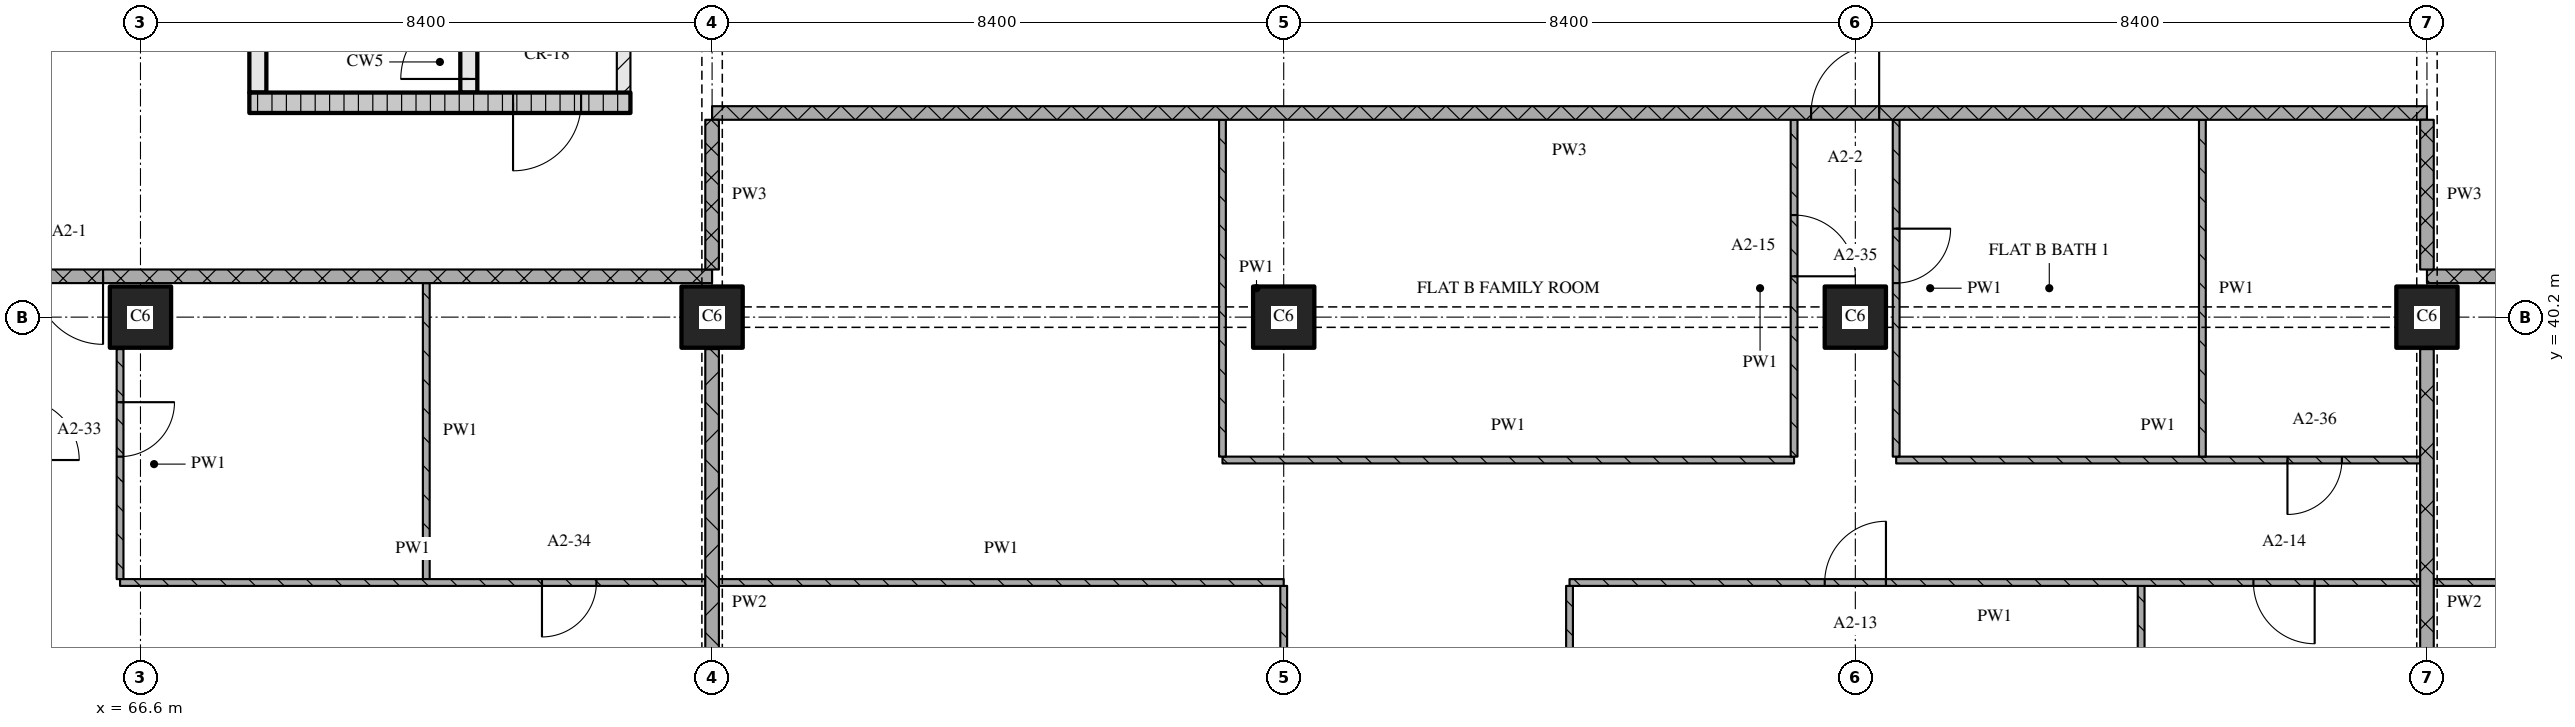
"""IFC4 building model, lengths in metres.
Left out: names, types, materials, properties, quantities, classifications, styles, units other than length and angle.
Written with IfcOpenShell. Run it as: python <this file> out.ifc"""

import sys

from ifc_helpers import new_model, si_unit, direction, frame, frame_2d, origin, origin_2d, place, context, subcontext, project, spatial, rectangle, extrude, element, fill, save


model = new_model("IFC4")
c1 = context("Model", 3, precision=1e-05, world=origin(), true_north=direction((0.0, 1.0)))
c2 = subcontext(c1, "Body", "Model", "MODEL_VIEW")
j1 = project(units=[si_unit("LENGTHUNIT", "METRE"), si_unit("PLANEANGLEUNIT", "RADIAN")], contexts=[c1])
p1 = place(None, origin())
s1 = spatial("IfcSite", under=j1, at=p1, CompositionType="ELEMENT")
p2 = place(p1, origin())
s2 = spatial("IfcBuilding", under=s1, at=p2, CompositionType="ELEMENT")
p3 = place(p2, frame((0.0, 0.0, 48.0)))
s3 = spatial("IfcBuildingStorey", under=s2, at=p3, CompositionType="ELEMENT", Elevation=48.0)
for number, where, z_axis, x_axis in (
    (1, (66.6, 40.2, 0.0), (0.0, 0.0, 1.0), (1.0, 0.0, 0.0)),
    (2, (75.0, 40.2, 0.0), (0.0, 0.0, 1.0), (1.0, 0.0, 0.0)),
    (3, (83.4, 40.2, 0.0), (0.0, 0.0, 1.0), (1.0, 0.0, 0.0)),
    (4, (91.8, 40.2, 0.0), (0.0, 0.0, 1.0), (1.0, 0.0, 0.0)),
    (5, (100.2, 40.2, 0.0), (0.0, 0.0, 1.0), (1.0, 0.0, 0.0)),
):
    element("IfcColumn", number, at=place(p3, frame(where, z_axis=z_axis, x_axis=x_axis)), inside=s3, PredefinedType="COLUMN", context=c2, shape_type="SweptSolid", body=[
        extrude(rectangle(XDim=0.9, YDim=0.9, at=origin_2d()), origin(), (0.0, 0.0, 1.0), 3.6),
    ])
p4 = place(p3, frame((68.2, 43.35, 0.0), z_axis=(0.0, 0.0, 1.0), x_axis=(1.0, 0.0, 0.0)))
e6 = element("IfcWall", 6, at=p4, inside=s3, PredefinedType="SOLIDWALL", context=c2, shape_type="SweptSolid", body=[
    extrude(rectangle(XDim=5.6, YDim=0.3, at=frame_2d((2.8, 0.0))), origin(), (0.0, 0.0, 1.0), 3.32),
])
p5 = place(p4, frame((3.875, 0.0, 0.0)))
e7 = element("IfcOpeningElement", 7, at=p5, cuts=e6, PredefinedType="OPENING", context=c2, shape_type="SweptSolid", body=[
    extrude(rectangle(XDim=1.0, YDim=2.1, at=frame_2d((0.5, 1.05))), frame((0.0, 0.16, 0.0), z_axis=(0.0, -1.0, 0.0), x_axis=(1.0, 0.0, 0.0)), (0.0, 0.0, 1.0), 0.32),
])
p6 = place(p3, frame((68.325, 43.5, 0.0), z_axis=(0.0, 0.0, 1.0), x_axis=(0.0, 1.0, 0.0)))
e8 = element("IfcWall", 8, at=p6, inside=s3, PredefinedType="SOLIDWALL", context=c2, shape_type="SweptSolid", body=[
    extrude(rectangle(XDim=6.9, YDim=0.25, at=frame_2d((3.45, 0.0))), origin(), (0.0, 0.0, 1.0), 3.32),
])
p7 = place(p3, frame((71.425, 43.5, 0.0), z_axis=(0.0, 0.0, 1.0), x_axis=(0.0, 1.0, 0.0)))
e9 = element("IfcWall", 9, at=p7, inside=s3, PredefinedType="SOLIDWALL", context=c2, shape_type="SweptSolid", body=[
    extrude(rectangle(XDim=6.9, YDim=0.25, at=frame_2d((3.45, 0.0))), origin(), (0.0, 0.0, 1.0), 3.32),
])
p8 = place(p7, frame((0.2, 0.0, 0.0)))
e10 = element("IfcOpeningElement", 10, at=p8, cuts=e9, PredefinedType="OPENING", context=c2, shape_type="SweptSolid", body=[
    extrude(rectangle(XDim=1.0, YDim=2.1, at=frame_2d((0.5, 1.05))), frame((0.0, 0.135, 0.0), z_axis=(0.0, -1.0, 0.0), x_axis=(1.0, 0.0, 0.0)), (0.0, 0.0, 1.0), 0.27),
])
p9 = place(p3, frame((73.7, 43.5, 0.0), z_axis=(0.0, 0.0, 1.0), x_axis=(0.0, 1.0, 0.0)))
e11 = element("IfcWall", 11, at=p9, inside=s3, PredefinedType="PARTITIONING", context=c2, shape_type="SweptSolid", body=[
    extrude(rectangle(XDim=6.9, YDim=0.2, at=frame_2d((3.45, 0.0))), origin(), (0.0, 0.0, 1.0), 3.32),
])
p10 = place(p9, frame((1.0, 0.0, 0.0)))
e12 = element("IfcOpeningElement", 12, at=p10, cuts=e11, PredefinedType="OPENING", context=c2, shape_type="SweptSolid", body=[
    extrude(rectangle(XDim=1.0, YDim=2.1, at=frame_2d((0.5, 1.05))), frame((0.0, 0.11, 0.0), z_axis=(0.0, -1.0, 0.0), x_axis=(1.0, 0.0, 0.0)), (0.0, 0.0, 1.0), 0.22),
])
p11 = place(p3, frame((82.5, 38.1, 0.0), z_axis=(0.0, 0.0, 1.0), x_axis=(1.0, 0.0, 0.0)))
e13 = element("IfcWall", 13, at=p11, inside=s3, PredefinedType="PARTITIONING", context=c2, shape_type="SweptSolid", body=[
    extrude(rectangle(XDim=8.4, YDim=0.1, at=frame_2d((4.2, 0.0))), origin(), (0.0, 0.0, 1.0), 3.32),
])
p12 = place(p3, frame((92.4, 38.1, 0.0), z_axis=(0.0, 0.0, 1.0), x_axis=(1.0, 0.0, 0.0)))
e14 = element("IfcWall", 14, at=p12, inside=s3, PredefinedType="PARTITIONING", context=c2, shape_type="SweptSolid", body=[
    extrude(rectangle(XDim=7.7, YDim=0.1, at=frame_2d((3.85, 0.0))), origin(), (0.0, 0.0, 1.0), 3.32),
])
p13 = place(p12, frame((5.75, 0.0, 0.0)))
e15 = element("IfcOpeningElement", 15, at=p13, cuts=e14, PredefinedType="OPENING", context=c2, shape_type="SweptSolid", body=[
    extrude(rectangle(XDim=0.8, YDim=2.1, at=frame_2d((0.4, 1.05))), frame((0.0, 0.06, 0.0), z_axis=(0.0, -1.0, 0.0), x_axis=(1.0, 0.0, 0.0)), (0.0, 0.0, 1.0), 0.12),
])
p14 = place(p3, frame((75.0, 40.8, 0.0), z_axis=(0.0, 0.0, 1.0), x_axis=(-1.0, 0.0, 0.0)))
e16 = element("IfcWall", 16, at=p14, inside=s3, PredefinedType="PARTITIONING", context=c2, shape_type="SweptSolid", body=[
    extrude(rectangle(XDim=24.08, YDim=0.2, at=frame_2d((12.04, 0.0))), origin(), (0.0, 0.0, 1.0), 3.32),
])
p15 = place(p14, frame((8.95, 0.0, 0.0)))
e17 = element("IfcOpeningElement", 17, at=p15, cuts=e16, PredefinedType="OPENING", context=c2, shape_type="SweptSolid", body=[
    extrude(rectangle(XDim=1.0, YDim=2.1, at=frame_2d((0.5, 1.05))), frame((0.0, 0.11, 0.0), z_axis=(0.0, -1.0, 0.0), x_axis=(1.0, 0.0, 0.0)), (0.0, 0.0, 1.0), 0.22),
])
p16 = place(p3, frame((124.28, 40.8, 0.0), z_axis=(0.0, 0.0, 1.0), x_axis=(-1.0, 0.0, 0.0)))
e18 = element("IfcWall", 18, at=p16, inside=s3, PredefinedType="PARTITIONING", context=c2, shape_type="SweptSolid", body=[
    extrude(rectangle(XDim=24.08, YDim=0.2, at=frame_2d((12.04, 0.0))), origin(), (0.0, 0.0, 1.0), 3.32),
])
p17 = place(p16, frame((12.93, 0.0, 0.0)))
e19 = element("IfcOpeningElement", 19, at=p17, cuts=e18, PredefinedType="OPENING", context=c2, shape_type="SweptSolid", body=[
    extrude(rectangle(XDim=1.0, YDim=2.1, at=frame_2d((0.5, 1.05))), frame((0.0, 0.11, 0.0), z_axis=(0.0, -1.0, 0.0), x_axis=(1.0, 0.0, 0.0)), (0.0, 0.0, 1.0), 0.22),
])
p18 = place(p3, frame((100.2, 43.2, 0.0), z_axis=(0.0, 0.0, 1.0), x_axis=(-1.0, 0.0, 0.0)))
e20 = element("IfcWall", 20, at=p18, inside=s3, PredefinedType="PARTITIONING", context=c2, shape_type="SweptSolid", body=[
    extrude(rectangle(XDim=25.2, YDim=0.2, at=frame_2d((12.6, 0.0))), origin(), (0.0, 0.0, 1.0), 3.32),
])
p19 = place(p18, frame((8.05, 0.0, 0.0)))
e21 = element("IfcOpeningElement", 21, at=p19, cuts=e20, PredefinedType="OPENING", context=c2, shape_type="SweptSolid", body=[
    extrude(rectangle(XDim=1.0, YDim=2.1, at=frame_2d((0.5, 1.05))), frame((0.0, 0.11, 0.0), z_axis=(0.0, -1.0, 0.0), x_axis=(1.0, 0.0, 0.0)), (0.0, 0.0, 1.0), 0.22),
])
p20 = place(p3, frame((66.3, 39.73, 0.0), z_axis=(0.0, 0.0, 1.0), x_axis=(0.0, -1.0, 0.0)))
e22 = element("IfcWall", 22, at=p20, inside=s3, PredefinedType="PARTITIONING", context=c2, shape_type="SweptSolid", body=[
    extrude(rectangle(XDim=3.38, YDim=0.1, at=frame_2d((1.69, 0.0))), origin(), (0.0, 0.0, 1.0), 3.32),
])
p21 = place(p20, frame((0.78, 0.0, 0.0)))
e23 = element("IfcOpeningElement", 23, at=p21, cuts=e22, PredefinedType="OPENING", context=c2, shape_type="SweptSolid", body=[
    extrude(rectangle(XDim=0.8, YDim=2.1, at=frame_2d((0.4, 1.05))), frame((0.0, 0.06, 0.0), z_axis=(0.0, -1.0, 0.0), x_axis=(1.0, 0.0, 0.0)), (0.0, 0.0, 1.0), 0.12),
])
p22 = place(p3, frame((70.8, 40.7, 0.0), z_axis=(0.0, 0.0, 1.0), x_axis=(0.0, -1.0, 0.0)))
e24 = element("IfcWall", 24, at=p22, inside=s3, PredefinedType="PARTITIONING", context=c2, shape_type="SweptSolid", body=[
    extrude(rectangle(XDim=4.35, YDim=0.1, at=frame_2d((2.175, 0.0))), origin(), (0.0, 0.0, 1.0), 3.32),
])
p23 = place(p3, frame((75.0, 43.1, 0.0), z_axis=(0.0, 0.0, 1.0), x_axis=(0.0, -1.0, 0.0)))
e25 = element("IfcWall", 25, at=p23, inside=s3, PredefinedType="PARTITIONING", context=c2, shape_type="SweptSolid", body=[
    extrude(rectangle(XDim=2.2, YDim=0.2, at=frame_2d((1.1, 0.0))), origin(), (0.0, 0.0, 1.0), 2.43),
])
p24 = place(p3, frame((75.0, 39.73, 0.0), z_axis=(0.0, 0.0, 1.0), x_axis=(0.0, -1.0, 0.0)))
e26 = element("IfcWall", 26, at=p24, inside=s3, PredefinedType="PARTITIONING", context=c2, shape_type="SweptSolid", body=[
    extrude(rectangle(XDim=7.46, YDim=0.2, at=frame_2d((3.73, 0.0))), origin(), (0.0, 0.0, 1.0), 2.83),
])
p25 = place(p3, frame((82.5, 43.1, 0.0), z_axis=(0.0, 0.0, 1.0), x_axis=(0.0, -1.0, 0.0)))
e27 = element("IfcWall", 27, at=p25, inside=s3, PredefinedType="PARTITIONING", context=c2, shape_type="SweptSolid", body=[
    extrude(rectangle(XDim=4.95, YDim=0.1, at=frame_2d((2.475, 0.0))), origin(), (0.0, 0.0, 1.0), 3.32),
])
p26 = place(p3, frame((83.4, 32.27, 0.0), z_axis=(0.0, 0.0, 1.0), x_axis=(0.0, 1.0, 0.0)))
e28 = element("IfcWall", 28, at=p26, inside=s3, PredefinedType="PARTITIONING", context=c2, shape_type="SweptSolid", body=[
    extrude(rectangle(XDim=3.98, YDim=0.1, at=frame_2d((1.99, 0.0))), origin(), (0.0, 0.0, 1.0), 3.32),
])
p27 = place(p26, frame((0.43, 0.0, 0.0)))
e29 = element("IfcOpeningElement", 29, at=p27, cuts=e28, PredefinedType="OPENING", context=c2, shape_type="SweptSolid", body=[
    extrude(rectangle(XDim=0.9, YDim=2.1, at=frame_2d((0.45, 1.05))), frame((0.0, 0.06, 0.0), z_axis=(0.0, -1.0, 0.0), x_axis=(1.0, 0.0, 0.0)), (0.0, 0.0, 1.0), 0.12),
])
p28 = place(p3, frame((87.6, 36.25, 0.0), z_axis=(0.0, 0.0, 1.0), x_axis=(0.0, -1.0, 0.0)))
e30 = element("IfcWall", 30, at=p28, inside=s3, PredefinedType="PARTITIONING", context=c2, shape_type="SweptSolid", body=[
    extrude(rectangle(XDim=5.97, YDim=0.1, at=frame_2d((2.985, 0.0))), origin(), (0.0, 0.0, 1.0), 3.32),
])
p29 = place(p3, frame((90.9, 38.15, 0.0), z_axis=(0.0, 0.0, 1.0), x_axis=(0.0, 1.0, 0.0)))
e31 = element("IfcWall", 31, at=p29, inside=s3, PredefinedType="PARTITIONING", context=c2, shape_type="SweptSolid", body=[
    extrude(rectangle(XDim=4.95, YDim=0.1, at=frame_2d((2.475, 0.0))), origin(), (0.0, 0.0, 1.0), 3.32),
])
p30 = place(p29, frame((2.65, 0.0, 0.0)))
e32 = element("IfcOpeningElement", 32, at=p30, cuts=e31, PredefinedType="OPENING", context=c2, shape_type="SweptSolid", body=[
    extrude(rectangle(XDim=0.9, YDim=2.1, at=frame_2d((0.45, 1.05))), frame((0.0, 0.06, 0.0), z_axis=(0.0, -1.0, 0.0), x_axis=(1.0, 0.0, 0.0)), (0.0, 0.0, 1.0), 0.12),
])
p31 = place(p3, frame((92.4, 43.1, 0.0), z_axis=(0.0, 0.0, 1.0), x_axis=(0.0, -1.0, 0.0)))
e33 = element("IfcWall", 33, at=p31, inside=s3, PredefinedType="PARTITIONING", context=c2, shape_type="SweptSolid", body=[
    extrude(rectangle(XDim=4.95, YDim=0.1, at=frame_2d((2.475, 0.0))), origin(), (0.0, 0.0, 1.0), 3.32),
])
p32 = place(p31, frame((1.6, 0.0, 0.0)))
e34 = element("IfcOpeningElement", 34, at=p32, cuts=e33, PredefinedType="OPENING", context=c2, shape_type="SweptSolid", body=[
    extrude(rectangle(XDim=0.8, YDim=2.1, at=frame_2d((0.4, 1.05))), frame((0.0, 0.06, 0.0), z_axis=(0.0, -1.0, 0.0), x_axis=(1.0, 0.0, 0.0)), (0.0, 0.0, 1.0), 0.12),
])
p33 = place(p3, frame((96.0, 36.25, 0.0), z_axis=(0.0, 0.0, 1.0), x_axis=(0.0, -1.0, 0.0)))
e35 = element("IfcWall", 35, at=p33, inside=s3, PredefinedType="PARTITIONING", context=c2, shape_type="SweptSolid", body=[
    extrude(rectangle(XDim=5.97, YDim=0.1, at=frame_2d((2.985, 0.0))), origin(), (0.0, 0.0, 1.0), 3.32),
])
p34 = place(p3, frame((96.9, 43.1, 0.0), z_axis=(0.0, 0.0, 1.0), x_axis=(0.0, -1.0, 0.0)))
e36 = element("IfcWall", 36, at=p34, inside=s3, PredefinedType="PARTITIONING", context=c2, shape_type="SweptSolid", body=[
    extrude(rectangle(XDim=4.95, YDim=0.1, at=frame_2d((2.475, 0.0))), origin(), (0.0, 0.0, 1.0), 3.32),
])
p35 = place(p3, frame((100.2, 43.1, 0.0), z_axis=(0.0, 0.0, 1.0), x_axis=(0.0, -1.0, 0.0)))
e37 = element("IfcWall", 37, at=p35, inside=s3, PredefinedType="PARTITIONING", context=c2, shape_type="SweptSolid", body=[
    extrude(rectangle(XDim=2.2, YDim=0.2, at=frame_2d((1.1, 0.0))), origin(), (0.0, 0.0, 1.0), 2.43),
])
p36 = place(p3, frame((100.2, 39.73, 0.0), z_axis=(0.0, 0.0, 1.0), x_axis=(0.0, -1.0, 0.0)))
e38 = element("IfcWall", 38, at=p36, inside=s3, PredefinedType="PARTITIONING", context=c2, shape_type="SweptSolid", body=[
    extrude(rectangle(XDim=7.46, YDim=0.2, at=frame_2d((3.73, 0.0))), origin(), (0.0, 0.0, 1.0), 2.83),
])
p37 = place(p3, frame((66.3, 36.3, 0.0), z_axis=(0.0, 0.0, 1.0), x_axis=(1.0, 0.0, 0.0)))
e39 = element("IfcWall", 39, at=p37, inside=s3, PredefinedType="PARTITIONING", context=c2, shape_type="SweptSolid", body=[
    extrude(rectangle(XDim=8.6, YDim=0.1, at=frame_2d((4.3, 0.0))), origin(), (0.0, 0.0, 1.0), 3.32),
])
p38 = place(p37, frame((6.2, 0.0, 0.0)))
e40 = element("IfcOpeningElement", 40, at=p38, cuts=e39, PredefinedType="OPENING", context=c2, shape_type="SweptSolid", body=[
    extrude(rectangle(XDim=0.8, YDim=2.1, at=frame_2d((0.4, 1.05))), frame((0.0, 0.06, 0.0), z_axis=(0.0, -1.0, 0.0), x_axis=(1.0, 0.0, 0.0)), (0.0, 0.0, 1.0), 0.12),
])
p39 = place(p3, frame((75.1, 36.3, 0.0), z_axis=(0.0, 0.0, 1.0), x_axis=(1.0, 0.0, 0.0)))
e41 = element("IfcWall", 41, at=p39, inside=s3, PredefinedType="PARTITIONING", context=c2, shape_type="SweptSolid", body=[
    extrude(rectangle(XDim=8.3, YDim=0.1, at=frame_2d((4.15, 0.0))), origin(), (0.0, 0.0, 1.0), 3.32),
])
p40 = place(p3, frame((100.1, 36.3, 0.0), z_axis=(0.0, 0.0, 1.0), x_axis=(-1.0, 0.0, 0.0)))
e42 = element("IfcWall", 42, at=p40, inside=s3, PredefinedType="PARTITIONING", context=c2, shape_type="SweptSolid", body=[
    extrude(rectangle(XDim=12.5, YDim=0.1, at=frame_2d((6.25, 0.0))), origin(), (0.0, 0.0, 1.0), 3.32),
])
p41 = place(p40, frame((1.55, 0.0, 0.0)))
e43 = element("IfcOpeningElement", 43, at=p41, cuts=e42, PredefinedType="OPENING", context=c2, shape_type="SweptSolid", body=[
    extrude(rectangle(XDim=0.9, YDim=2.1, at=frame_2d((0.45, 1.05))), frame((0.0, 0.06, 0.0), z_axis=(0.0, -1.0, 0.0), x_axis=(1.0, 0.0, 0.0)), (0.0, 0.0, 1.0), 0.12),
])
p42 = place(p40, frame((7.85, 0.0, 0.0)))
e44 = element("IfcOpeningElement", 44, at=p42, cuts=e42, PredefinedType="OPENING", context=c2, shape_type="SweptSolid", body=[
    extrude(rectangle(XDim=0.9, YDim=2.1, at=frame_2d((0.45, 1.05))), frame((0.0, 0.06, 0.0), z_axis=(0.0, -1.0, 0.0), x_axis=(1.0, 0.0, 0.0)), (0.0, 0.0, 1.0), 0.12),
])
p43 = place(p3, frame((100.3, 36.3, 0.0), z_axis=(0.0, 0.0, 1.0), x_axis=(1.0, 0.0, 0.0)))
e45 = element("IfcWall", 45, at=p43, inside=s3, PredefinedType="PARTITIONING", context=c2, shape_type="SweptSolid", body=[
    extrude(rectangle(XDim=9.8, YDim=0.1, at=frame_2d((4.9, 0.0))), origin(), (0.0, 0.0, 1.0), 3.32),
])
p44 = place(p43, frame((1.75, 0.0, 0.0)))
e46 = element("IfcOpeningElement", 46, at=p44, cuts=e45, PredefinedType="OPENING", context=c2, shape_type="SweptSolid", body=[
    extrude(rectangle(XDim=0.8, YDim=2.1, at=frame_2d((0.4, 1.05))), frame((0.0, 0.06, 0.0), z_axis=(0.0, -1.0, 0.0), x_axis=(1.0, 0.0, 0.0)), (0.0, 0.0, 1.0), 0.12),
])
p45 = place(p5, origin())
e47 = element("IfcDoor", 47, at=p45, inside=s3, OperationType="SINGLE_SWING_RIGHT", PredefinedType="DOOR", context=c2, shape_type="SweptSolid", body=[
    extrude(rectangle(XDim=1.0, YDim=2.1, at=frame_2d((0.5, 1.05))), frame((0.0, 0.025, 0.0), z_axis=(0.0, -1.0, 0.0), x_axis=(1.0, 0.0, 0.0)), (0.0, 0.0, 1.0), 0.05),
])
fill(e7, e47)
p46 = place(p8, origin())
e48 = element("IfcDoor", 48, at=p46, inside=s3, OperationType="SINGLE_SWING_LEFT", PredefinedType="DOOR", context=c2, shape_type="SweptSolid", body=[
    extrude(rectangle(XDim=1.0, YDim=2.1, at=frame_2d((0.5, 1.05))), frame((0.0, 0.025, 0.0), z_axis=(0.0, -1.0, 0.0), x_axis=(1.0, 0.0, 0.0)), (0.0, 0.0, 1.0), 0.05),
])
fill(e10, e48)
p47 = place(p13, origin())
e49 = element("IfcDoor", 49, at=p47, inside=s3, OperationType="SINGLE_SWING_RIGHT", PredefinedType="DOOR", context=c2, shape_type="SweptSolid", body=[
    extrude(rectangle(XDim=0.8, YDim=2.1, at=frame_2d((0.4, 1.05))), frame((0.0, 0.025, 0.0), z_axis=(0.0, -1.0, 0.0), x_axis=(1.0, 0.0, 0.0)), (0.0, 0.0, 1.0), 0.05),
])
fill(e15, e49)
p48 = place(p15, origin())
e50 = element("IfcDoor", 50, at=p48, inside=s3, OperationType="SINGLE_SWING_LEFT", PredefinedType="DOOR", context=c2, shape_type="SweptSolid", body=[
    extrude(rectangle(XDim=1.0, YDim=2.1, at=frame_2d((0.5, 1.05))), frame((0.0, 0.025, 0.0), z_axis=(0.0, -1.0, 0.0), x_axis=(1.0, 0.0, 0.0)), (0.0, 0.0, 1.0), 0.05),
])
fill(e17, e50)
p49 = place(p19, origin())
e51 = element("IfcDoor", 51, at=p49, inside=s3, OperationType="SINGLE_SWING_RIGHT", PredefinedType="DOOR", context=c2, shape_type="SweptSolid", body=[
    extrude(rectangle(XDim=1.0, YDim=2.1, at=frame_2d((0.5, 1.05))), frame((0.0, 0.025, 0.0), z_axis=(0.0, -1.0, 0.0), x_axis=(1.0, 0.0, 0.0)), (0.0, 0.0, 1.0), 0.05),
])
fill(e21, e51)
p50 = place(p21, origin())
e52 = element("IfcDoor", 52, at=p50, inside=s3, OperationType="SINGLE_SWING_LEFT", PredefinedType="DOOR", context=c2, shape_type="SweptSolid", body=[
    extrude(rectangle(XDim=0.8, YDim=2.1, at=frame_2d((0.4, 1.05))), frame((0.0, 0.025, 0.0), z_axis=(0.0, -1.0, 0.0), x_axis=(1.0, 0.0, 0.0)), (0.0, 0.0, 1.0), 0.05),
])
fill(e23, e52)
p51 = place(p30, origin())
e53 = element("IfcDoor", 53, at=p51, inside=s3, OperationType="SINGLE_SWING_RIGHT", PredefinedType="DOOR", context=c2, shape_type="SweptSolid", body=[
    extrude(rectangle(XDim=0.9, YDim=2.1, at=frame_2d((0.45, 1.05))), frame((0.0, 0.025, 0.0), z_axis=(0.0, -1.0, 0.0), x_axis=(1.0, 0.0, 0.0)), (0.0, 0.0, 1.0), 0.05),
])
fill(e32, e53)
p52 = place(p32, origin())
e54 = element("IfcDoor", 54, at=p52, inside=s3, OperationType="SINGLE_SWING_LEFT", PredefinedType="DOOR", context=c2, shape_type="SweptSolid", body=[
    extrude(rectangle(XDim=0.8, YDim=2.1, at=frame_2d((0.4, 1.05))), frame((0.0, 0.025, 0.0), z_axis=(0.0, -1.0, 0.0), x_axis=(1.0, 0.0, 0.0)), (0.0, 0.0, 1.0), 0.05),
])
fill(e34, e54)
p53 = place(p38, origin())
e55 = element("IfcDoor", 55, at=p53, inside=s3, OperationType="SINGLE_SWING_RIGHT", PredefinedType="DOOR", context=c2, shape_type="SweptSolid", body=[
    extrude(rectangle(XDim=0.8, YDim=2.1, at=frame_2d((0.4, 1.05))), frame((0.0, 0.025, 0.0), z_axis=(0.0, -1.0, 0.0), x_axis=(1.0, 0.0, 0.0)), (0.0, 0.0, 1.0), 0.05),
])
fill(e40, e55)
p54 = place(p41, origin())
e56 = element("IfcDoor", 56, at=p54, inside=s3, OperationType="SINGLE_SWING_LEFT", PredefinedType="DOOR", context=c2, shape_type="SweptSolid", body=[
    extrude(rectangle(XDim=0.9, YDim=2.1, at=frame_2d((0.45, 1.05))), frame((0.0, 0.025, 0.0), z_axis=(0.0, -1.0, 0.0), x_axis=(1.0, 0.0, 0.0)), (0.0, 0.0, 1.0), 0.05),
])
fill(e43, e56)
p55 = place(p42, origin())
e57 = element("IfcDoor", 57, at=p55, inside=s3, OperationType="SINGLE_SWING_RIGHT", PredefinedType="DOOR", context=c2, shape_type="SweptSolid", body=[
    extrude(rectangle(XDim=0.9, YDim=2.1, at=frame_2d((0.45, 1.05))), frame((0.0, 0.025, 0.0), z_axis=(0.0, -1.0, 0.0), x_axis=(1.0, 0.0, 0.0)), (0.0, 0.0, 1.0), 0.05),
])
fill(e44, e57)
save(model, sys.argv[1])
